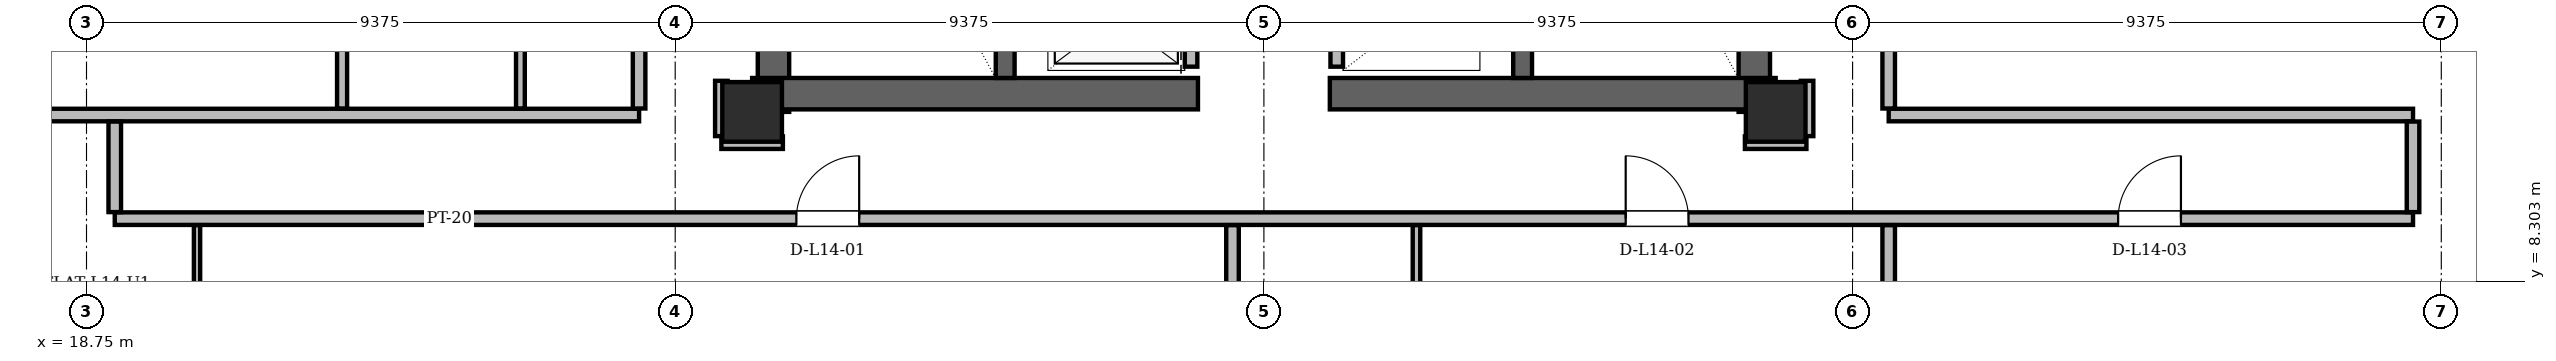
"""IFC4 building model, lengths in metres.
Left out: names, types, materials, properties, quantities, classifications, styles, units other than length and angle.
Written with IfcOpenShell. Run it as: python <this file> out.ifc"""

import sys

from ifc_helpers import new_model, si_unit, direction, frame, frame_2d, origin, origin_2d, place, context, subcontext, project, spatial, rectangle, hollow_rectangle, extrude, element, fill, save


model = new_model("IFC4")
c1 = context("Model", 3, precision=1e-05, world=origin(), true_north=direction((0.0, 1.0)))
c2 = subcontext(c1, "Body", "Model", "MODEL_VIEW")
j1 = project(units=[si_unit("LENGTHUNIT", "METRE"), si_unit("PLANEANGLEUNIT", "RADIAN")], contexts=[c1])
p1 = place(None, origin())
s1 = spatial("IfcSite", under=j1, at=p1, CompositionType="ELEMENT")
p2 = place(p1, origin())
s2 = spatial("IfcBuilding", under=s1, at=p2, CompositionType="ELEMENT")
p3 = place(p2, frame((0.0, 0.0, 56.1)))
s3 = spatial("IfcBuildingStorey", under=s2, at=p3, CompositionType="ELEMENT", Elevation=56.1)
for number, where, z_axis, x_axis in (
    (1, (29.35, 11.0, 0.0), (0.0, 0.0, 1.0), (1.0, 0.0, 0.0)),
    (2, (45.65, 11.0, 0.0), (0.0, 0.0, 1.0), (1.0, 0.0, 0.0)),
):
    element("IfcColumn", number, at=place(p3, frame(where, z_axis=z_axis, x_axis=x_axis)), inside=s3, PredefinedType="COLUMN", context=c2, shape_type="SweptSolid", body=[
        extrude(hollow_rectangle(XDim=0.95, YDim=0.95, WallThickness=0.08, at=origin_2d()), origin(), (0.0, 0.0, 1.0), 3.6),
    ])
for number, where, z_axis, x_axis in (
    (3, (29.69, 11.0, 0.0), (0.0, 0.0, 1.0), (0.0, 1.0, 0.0)),
    (4, (45.31, 11.0, 0.0), (0.0, 0.0, 1.0), (0.0, 1.0, 0.0)),
):
    element("IfcWall", number, at=place(p3, frame(where, z_axis=z_axis, x_axis=x_axis)), inside=s3, PredefinedType="SHEAR", context=c2, shape_type="SweptSolid", body=[
        extrude(rectangle(XDim=13.3, YDim=0.5, at=frame_2d((6.65, 0.0))), origin(), (0.0, 0.0, 1.0), 3.36),
    ])
for number, where, z_axis, x_axis in (
    (5, (29.35, 11.29, 0.0), (0.0, 0.0, 1.0), (1.0, 0.0, 0.0)),
    (6, (38.55, 11.29, 0.0), (0.0, 0.0, 1.0), (1.0, 0.0, 0.0)),
):
    element("IfcWall", number, at=place(p3, frame(where, z_axis=z_axis, x_axis=x_axis)), inside=s3, PredefinedType="SHEAR", context=c2, shape_type="SweptSolid", body=[
        extrude(rectangle(XDim=7.1, YDim=0.5, at=frame_2d((3.55, 0.0))), origin(), (0.0, 0.0, 1.0), 3.36),
    ])
for number, where, z_axis, x_axis in (
    (7, (33.38, 11.54, 0.0), (0.0, 0.0, 1.0), (0.0, 1.0, 0.0)),
    (8, (41.62, 11.54, 0.0), (0.0, 0.0, 1.0), (0.0, 1.0, 0.0)),
):
    element("IfcWall", number, at=place(p3, frame(where, z_axis=z_axis, x_axis=x_axis)), inside=s3, PredefinedType="SHEAR", context=c2, shape_type="SweptSolid", body=[
        extrude(rectangle(XDim=7.62, YDim=0.3, at=frame_2d((3.81, 0.0))), origin(), (0.0, 0.0, 1.0), 3.36),
    ])
p4 = place(p3, frame((13.604, 14.559, 0.0), z_axis=(0.0, 0.0, 1.0), x_axis=(0.500012153807, -0.866018386667, 0.0)))
e9 = element("IfcWall", 9, at=p4, inside=s3, PredefinedType="SOLIDWALL", context=c2, shape_type="SweptSolid", body=[
    extrude(rectangle(XDim=14.298, YDim=0.34, at=frame_2d((7.149, 0.0))), origin(), (0.0, 0.0, 1.0), 2.494),
])
p5 = place(p4, frame((1.174, 0.0, 1.28)))
e10 = element("IfcOpeningElement", 10, at=p5, cuts=e9, PredefinedType="OPENING", context=c2, shape_type="SweptSolid", body=[
    extrude(rectangle(XDim=0.85, YDim=0.92, at=frame_2d((0.425, 0.46))), frame((0.0, 0.17, 0.0), z_axis=(0.0, -1.0, 0.0), x_axis=(1.0, 0.0, 0.0)), (0.0, 0.0, 1.0), 0.34),
])
p6 = place(p3, frame((54.247, 2.176, 0.0), z_axis=(0.0, 0.0, 1.0), x_axis=(0.500012153807, 0.866018386667, 0.0)))
e11 = element("IfcWall", 11, at=p6, inside=s3, PredefinedType="SOLIDWALL", context=c2, shape_type="SweptSolid", body=[
    extrude(rectangle(XDim=14.298, YDim=0.34, at=frame_2d((7.149, 0.0))), origin(), (0.0, 0.0, 1.0), 2.494),
])
p7 = place(p3, frame((36.34, 11.72, 0.0), z_axis=(0.0, 0.0, 1.0), x_axis=(0.0, 1.0, 0.0)))
e12 = element("IfcWall", 12, at=p7, inside=s3, PredefinedType="PARTITIONING", context=c2, shape_type="SweptSolid", body=[
    extrude(rectangle(XDim=7.6, YDim=0.2, at=frame_2d((3.8, 0.0))), origin(), (0.0, 0.0, 1.0), 3.36),
])
p8 = place(p7, frame((0.255, 0.0, 0.0)))
e13 = element("IfcOpeningElement", 13, at=p8, cuts=e12, PredefinedType="OPENING", context=c2, shape_type="SweptSolid", body=[
    extrude(rectangle(XDim=1.05, YDim=2.15, at=frame_2d((0.525, 1.075))), frame((0.0, 0.1, 0.0), z_axis=(0.0, -1.0, 0.0), x_axis=(1.0, 0.0, 0.0)), (0.0, 0.0, 1.0), 0.2),
])
p9 = place(p7, frame((2.105, 0.0, 0.0)))
e14 = element("IfcOpeningElement", 14, at=p9, cuts=e12, PredefinedType="OPENING", context=c2, shape_type="SweptSolid", body=[
    extrude(rectangle(XDim=1.05, YDim=2.15, at=frame_2d((0.525, 1.075))), frame((0.0, 0.1, 0.0), z_axis=(0.0, -1.0, 0.0), x_axis=(1.0, 0.0, 0.0)), (0.0, 0.0, 1.0), 0.2),
])
p10 = place(p7, frame((3.955, 0.0, 0.0)))
e15 = element("IfcOpeningElement", 15, at=p10, cuts=e12, PredefinedType="OPENING", context=c2, shape_type="SweptSolid", body=[
    extrude(rectangle(XDim=1.05, YDim=2.15, at=frame_2d((0.525, 1.075))), frame((0.0, 0.1, 0.0), z_axis=(0.0, -1.0, 0.0), x_axis=(1.0, 0.0, 0.0)), (0.0, 0.0, 1.0), 0.2),
])
p11 = place(p3, frame((38.66, 11.72, 0.0), z_axis=(0.0, 0.0, 1.0), x_axis=(0.0, 1.0, 0.0)))
e16 = element("IfcWall", 16, at=p11, inside=s3, PredefinedType="PARTITIONING", context=c2, shape_type="SweptSolid", body=[
    extrude(rectangle(XDim=9.1, YDim=0.2, at=frame_2d((4.55, 0.0))), origin(), (0.0, 0.0, 1.0), 3.36),
])
p12 = place(p3, frame((19.2, 9.3, 0.0), z_axis=(0.0, 0.0, 1.0), x_axis=(1.0, 0.0, 0.0)))
e17 = element("IfcWall", 17, at=p12, inside=s3, PredefinedType="PARTITIONING", context=c2, shape_type="SweptSolid", body=[
    extrude(rectangle(XDim=36.6, YDim=0.2, at=frame_2d((18.3, 0.0))), origin(), (0.0, 0.0, 1.0), 2.738),
])
p13 = place(p12, frame((10.855, 0.0, 0.0)))
e18 = element("IfcOpeningElement", 18, at=p13, cuts=e17, PredefinedType="OPENING", context=c2, shape_type="SweptSolid", body=[
    extrude(rectangle(XDim=1.0, YDim=2.18, at=frame_2d((0.5, 1.09))), frame((0.0, 0.1, 0.0), z_axis=(0.0, -1.0, 0.0), x_axis=(1.0, 0.0, 0.0)), (0.0, 0.0, 1.0), 0.2),
])
p14 = place(p12, frame((24.062, 0.0, 0.0)))
e19 = element("IfcOpeningElement", 19, at=p14, cuts=e17, PredefinedType="OPENING", context=c2, shape_type="SweptSolid", body=[
    extrude(rectangle(XDim=1.0, YDim=2.18, at=frame_2d((0.5, 1.09))), frame((0.0, 0.1, 0.0), z_axis=(0.0, -1.0, 0.0), x_axis=(1.0, 0.0, 0.0)), (0.0, 0.0, 1.0), 0.2),
])
p15 = place(p12, frame((31.904, 0.0, 0.0)))
e20 = element("IfcOpeningElement", 20, at=p15, cuts=e17, PredefinedType="OPENING", context=c2, shape_type="SweptSolid", body=[
    extrude(rectangle(XDim=1.0, YDim=2.18, at=frame_2d((0.5, 1.09))), frame((0.0, 0.1, 0.0), z_axis=(0.0, -1.0, 0.0), x_axis=(1.0, 0.0, 0.0)), (0.0, 0.0, 1.0), 0.2),
])
for number, where, z_axis, x_axis in (
    (21, (28.86, 10.51, 0.0), (0.0, 0.0, 1.0), (1.0, 0.0, 0.0)),
    (22, (45.16, 10.51, 0.0), (0.0, 0.0, 1.0), (1.0, 0.0, 0.0)),
):
    element("IfcWall", number, at=place(p3, frame(where, z_axis=z_axis, x_axis=x_axis)), inside=s3, PredefinedType="PARTITIONING", context=c2, shape_type="SweptSolid", body=[
        extrude(rectangle(XDim=0.98, YDim=0.2, at=frame_2d((0.49, 0.0))), origin(), (0.0, 0.0, 1.0), 2.738),
    ])
p16 = place(p3, frame((15.888, 10.95, 0.0), z_axis=(0.0, 0.0, 1.0), x_axis=(1.0, 0.0, 0.0)))
e23 = element("IfcWall", 23, at=p16, inside=s3, PredefinedType="PARTITIONING", context=c2, shape_type="SweptSolid", body=[
    extrude(rectangle(XDim=11.662, YDim=0.2, at=frame_2d((5.831, 0.0))), origin(), (0.0, 0.0, 1.0), 3.36),
])
p17 = place(p3, frame((47.45, 10.95, 0.0), z_axis=(0.0, 0.0, 1.0), x_axis=(1.0, 0.0, 0.0)))
e24 = element("IfcWall", 24, at=p17, inside=s3, PredefinedType="PARTITIONING", context=c2, shape_type="SweptSolid", body=[
    extrude(rectangle(XDim=8.35, YDim=0.2, at=frame_2d((4.175, 0.0))), origin(), (0.0, 0.0, 1.0), 3.36),
])
p18 = place(p3, frame((19.2, 9.404, 0.0), z_axis=(0.0, 0.0, 1.0), x_axis=(0.0, 1.0, 0.0)))
e25 = element("IfcWall", 25, at=p18, inside=s3, PredefinedType="PARTITIONING", context=c2, shape_type="SweptSolid", body=[
    extrude(rectangle(XDim=1.442, YDim=0.2, at=frame_2d((0.721, 0.0))), origin(), (0.0, 0.0, 1.0), 3.36),
])
p19 = place(p3, frame((20.51, 2.945, 0.0), z_axis=(0.0, 0.0, 1.0), x_axis=(0.0, 1.0, 0.0)))
e26 = element("IfcWall", 26, at=p19, inside=s3, PredefinedType="PARTITIONING", context=c2, shape_type="SweptSolid", body=[
    extrude(rectangle(XDim=6.251, YDim=0.1, at=frame_2d((3.125, 0.0))), origin(), (0.0, 0.0, 1.0), 3.36),
])
p20 = place(p19, frame((2.709, 0.0, 0.0)))
e27 = element("IfcOpeningElement", 27, at=p20, cuts=e26, PredefinedType="OPENING", context=c2, shape_type="SweptSolid", body=[
    extrude(rectangle(XDim=0.88, YDim=2.08, at=frame_2d((0.44, 1.04))), frame((0.0, 0.05, 0.0), z_axis=(0.0, -1.0, 0.0), x_axis=(1.0, 0.0, 0.0)), (0.0, 0.0, 1.0), 0.1),
])
p21 = place(p3, frame((22.82, 11.054, 0.0), z_axis=(0.0, 0.0, 1.0), x_axis=(0.0, 1.0, 0.0)))
e28 = element("IfcWall", 28, at=p21, inside=s3, PredefinedType="PARTITIONING", context=c2, shape_type="SweptSolid", body=[
    extrude(rectangle(XDim=3.562, YDim=0.16, at=frame_2d((1.781, 0.0))), origin(), (0.0, 0.0, 1.0), 2.738),
])
p22 = place(p3, frame((25.66, 11.054, 0.0), z_axis=(0.0, 0.0, 1.0), x_axis=(0.0, 1.0, 0.0)))
e29 = element("IfcWall", 29, at=p22, inside=s3, PredefinedType="PARTITIONING", context=c2, shape_type="SweptSolid", body=[
    extrude(rectangle(XDim=3.562, YDim=0.14, at=frame_2d((1.781, 0.0))), origin(), (0.0, 0.0, 1.0), 2.738),
])
p23 = place(p3, frame((27.55, 11.054, 0.0), z_axis=(0.0, 0.0, 1.0), x_axis=(0.0, 1.0, 0.0)))
e30 = element("IfcWall", 30, at=p23, inside=s3, PredefinedType="PARTITIONING", context=c2, shape_type="SweptSolid", body=[
    extrude(rectangle(XDim=14.812, YDim=0.2, at=frame_2d((7.406, 0.0))), origin(), (0.0, 0.0, 1.0), 2.738),
])
p24 = place(p23, frame((7.932, 0.0, 0.0)))
e31 = element("IfcOpeningElement", 31, at=p24, cuts=e30, PredefinedType="OPENING", context=c2, shape_type="SweptSolid", body=[
    extrude(rectangle(XDim=1.0, YDim=2.18, at=frame_2d((0.5, 1.09))), frame((0.0, 0.1, 0.0), z_axis=(0.0, -1.0, 0.0), x_axis=(1.0, 0.0, 0.0)), (0.0, 0.0, 1.0), 0.2),
])
p25 = place(p3, frame((28.86, 10.614, 0.0), z_axis=(0.0, 0.0, 1.0), x_axis=(0.0, 1.0, 0.0)))
e32 = element("IfcWall", 32, at=p25, inside=s3, PredefinedType="PARTITIONING", context=c2, shape_type="SweptSolid", body=[
    extrude(rectangle(XDim=0.881, YDim=0.2, at=frame_2d((0.44, 0.0))), origin(), (0.0, 0.0, 1.0), 2.738),
])
p26 = place(p3, frame((37.0, 2.35, 0.0), z_axis=(0.0, 0.0, 1.0), x_axis=(0.0, 1.0, 0.0)))
e33 = element("IfcWall", 33, at=p26, inside=s3, PredefinedType="PARTITIONING", context=c2, shape_type="SweptSolid", body=[
    extrude(rectangle(XDim=6.846, YDim=0.2, at=frame_2d((3.423, 0.0))), origin(), (0.0, 0.0, 1.0), 3.36),
])
p27 = place(p3, frame((39.93, 2.35, 0.0), z_axis=(0.0, 0.0, 1.0), x_axis=(0.0, 1.0, 0.0)))
e34 = element("IfcWall", 34, at=p27, inside=s3, PredefinedType="PARTITIONING", context=c2, shape_type="SweptSolid", body=[
    extrude(rectangle(XDim=6.846, YDim=0.12, at=frame_2d((3.423, 0.0))), origin(), (0.0, 0.0, 1.0), 3.36),
])
p28 = place(p27, frame((3.023, 0.0, 0.0)))
e35 = element("IfcOpeningElement", 35, at=p28, cuts=e34, PredefinedType="OPENING", context=c2, shape_type="SweptSolid", body=[
    extrude(rectangle(XDim=0.88, YDim=2.08, at=frame_2d((0.44, 1.04))), frame((0.0, 0.06, 0.0), z_axis=(0.0, -1.0, 0.0), x_axis=(1.0, 0.0, 0.0)), (0.0, 0.0, 1.0), 0.12),
])
p29 = place(p3, frame((46.15, 10.614, 0.0), z_axis=(0.0, 0.0, 1.0), x_axis=(0.0, 1.0, 0.0)))
e36 = element("IfcWall", 36, at=p29, inside=s3, PredefinedType="PARTITIONING", context=c2, shape_type="SweptSolid", body=[
    extrude(rectangle(XDim=0.881, YDim=0.2, at=frame_2d((0.44, 0.0))), origin(), (0.0, 0.0, 1.0), 2.738),
])
p30 = place(p3, frame((47.45, 2.35, 0.0), z_axis=(0.0, 0.0, 1.0), x_axis=(0.0, 1.0, 0.0)))
e37 = element("IfcWall", 37, at=p30, inside=s3, PredefinedType="PARTITIONING", context=c2, shape_type="SweptSolid", body=[
    extrude(rectangle(XDim=6.846, YDim=0.2, at=frame_2d((3.423, 0.0))), origin(), (0.0, 0.0, 1.0), 2.738),
])
p31 = place(p3, frame((47.45, 11.054, 0.0), z_axis=(0.0, 0.0, 1.0), x_axis=(0.0, 1.0, 0.0)))
e38 = element("IfcWall", 38, at=p31, inside=s3, PredefinedType="PARTITIONING", context=c2, shape_type="SweptSolid", body=[
    extrude(rectangle(XDim=27.312, YDim=0.2, at=frame_2d((13.656, 0.0))), origin(), (0.0, 0.0, 1.0), 2.494),
])
p32 = place(p31, frame((10.989, 0.0, 0.0)))
e39 = element("IfcOpeningElement", 39, at=p32, cuts=e38, PredefinedType="OPENING", context=c2, shape_type="SweptSolid", body=[
    extrude(rectangle(XDim=1.0, YDim=2.18, at=frame_2d((0.5, 1.09))), frame((0.0, 0.1, 0.0), z_axis=(0.0, -1.0, 0.0), x_axis=(1.0, 0.0, 0.0)), (0.0, 0.0, 1.0), 0.2),
])
p33 = place(p3, frame((55.8, 9.404, 0.0), z_axis=(0.0, 0.0, 1.0), x_axis=(0.0, 1.0, 0.0)))
e40 = element("IfcWall", 40, at=p33, inside=s3, PredefinedType="PARTITIONING", context=c2, shape_type="SweptSolid", body=[
    extrude(rectangle(XDim=1.442, YDim=0.2, at=frame_2d((0.721, 0.0))), origin(), (0.0, 0.0, 1.0), 3.36),
])
p34 = place(p13, origin())
e41 = element("IfcDoor", 41, at=p34, inside=s3, OperationType="SINGLE_SWING_RIGHT", PredefinedType="DOOR", context=c2, shape_type="SweptSolid", body=[
    extrude(rectangle(XDim=1.0, YDim=2.18, at=frame_2d((0.5, 1.09))), frame((0.0, 0.025, 0.0), z_axis=(0.0, -1.0, 0.0), x_axis=(1.0, 0.0, 0.0)), (0.0, 0.0, 1.0), 0.05),
])
fill(e18, e41)
p35 = place(p14, origin())
e42 = element("IfcDoor", 42, at=p35, inside=s3, OperationType="SINGLE_SWING_LEFT", PredefinedType="DOOR", context=c2, shape_type="SweptSolid", body=[
    extrude(rectangle(XDim=1.0, YDim=2.18, at=frame_2d((0.5, 1.09))), frame((0.0, 0.025, 0.0), z_axis=(0.0, -1.0, 0.0), x_axis=(1.0, 0.0, 0.0)), (0.0, 0.0, 1.0), 0.05),
])
fill(e19, e42)
p36 = place(p15, origin())
e43 = element("IfcDoor", 43, at=p36, inside=s3, OperationType="SINGLE_SWING_RIGHT", PredefinedType="DOOR", context=c2, shape_type="SweptSolid", body=[
    extrude(rectangle(XDim=1.0, YDim=2.18, at=frame_2d((0.5, 1.09))), frame((0.0, 0.025, 0.0), z_axis=(0.0, -1.0, 0.0), x_axis=(1.0, 0.0, 0.0)), (0.0, 0.0, 1.0), 0.05),
])
fill(e20, e43)
save(model, sys.argv[1])
